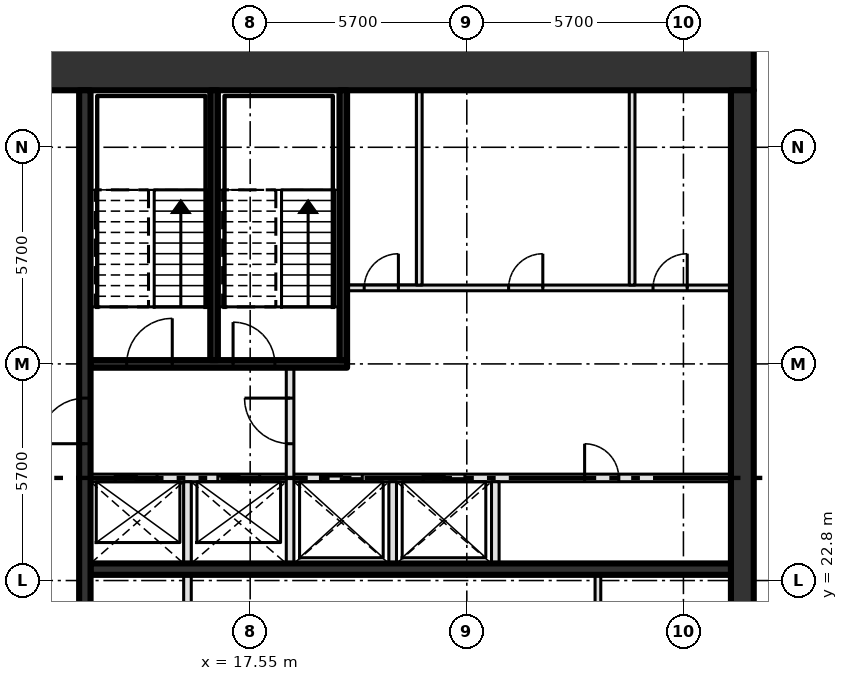
"""IFC4 building model, lengths in metres.
Left out: names, types, materials, properties, quantities, classifications, styles, units other than length and angle.
Written with IfcOpenShell. Run it as: python <this file> out.ifc"""

import sys

from ifc_helpers import new_model, si_unit, direction, frame, frame_2d, origin, place, context, subcontext, project, spatial, rectangle, extrude, element, fill, save


model = new_model("IFC4")
c1 = context("Model", 3, precision=1e-05, world=origin(), true_north=direction((0.0, 1.0)))
c2 = subcontext(c1, "Body", "Model", "MODEL_VIEW")
j1 = project(units=[si_unit("LENGTHUNIT", "METRE"), si_unit("PLANEANGLEUNIT", "RADIAN")], contexts=[c1])
p1 = place(None, origin())
s1 = spatial("IfcSite", under=j1, at=p1, CompositionType="ELEMENT")
p2 = place(p1, origin())
s2 = spatial("IfcBuilding", under=s1, at=p2, CompositionType="ELEMENT")
p3 = place(p2, frame((0.0, 0.0, 306.6)))
s3 = spatial("IfcBuildingStorey", under=s2, at=p3, CompositionType="ELEMENT", Elevation=306.6)
p4 = place(p3, frame((8.0, 36.3, -0.3), z_axis=(0.0, 0.0, 1.0), x_axis=(1.0, 0.0, 0.0)))
e1 = element("IfcWall", 1, at=p4, inside=s3, PredefinedType="SHEAR", context=c2, shape_type="SweptSolid", body=[
    extrude(rectangle(XDim=22.8, YDim=1.2, at=frame_2d((11.4, 0.0))), origin(), (0.0, 0.0, 1.0), 4.2),
])
p5 = place(p4, frame((2.3, 0.0, 0.3)))
e2 = element("IfcOpeningElement", 2, at=p5, cuts=e1, PredefinedType="OPENING", context=c2, shape_type="SweptSolid", body=[
    extrude(rectangle(XDim=1.8, YDim=2.1, at=frame_2d((0.9, 1.05))), frame((0.0, 0.61, 0.0), z_axis=(0.0, -1.0, 0.0), x_axis=(1.0, 0.0, 0.0)), (0.0, 0.0, 1.0), 1.22),
])
p6 = place(p3, frame((30.5, 14.7, -0.3), z_axis=(0.0, 0.0, 1.0), x_axis=(0.0, 1.0, 0.0)))
e3 = element("IfcWall", 3, at=p6, inside=s3, PredefinedType="SHEAR", context=c2, shape_type="SweptSolid", body=[
    extrude(rectangle(XDim=21.0, YDim=0.6, at=frame_2d((10.5, 0.0))), origin(), (0.0, 0.0, 1.0), 4.2),
])
p7 = place(p3, frame((13.35, 23.1, 0.0), z_axis=(0.0, 0.0, 1.0), x_axis=(1.0, 0.0, 0.0)))
e4 = element("IfcWall", 4, at=p7, inside=s3, PredefinedType="SHEAR", context=c2, shape_type="SweptSolid", body=[
    extrude(rectangle(XDim=16.85, YDim=0.3, at=frame_2d((8.425, 0.0))), origin(), (0.0, 0.0, 1.0), 3.9),
])
p8 = place(p3, frame((13.35, 25.5, 0.0), z_axis=(0.0, 0.0, 1.0), x_axis=(1.0, 0.0, 0.0)))
e5 = element("IfcWall", 5, at=p8, inside=s3, PredefinedType="SOLIDWALL", context=c2, shape_type="SweptSolid", body=[
    extrude(rectangle(XDim=16.85, YDim=0.2, at=frame_2d((8.425, 0.0))), origin(), (0.0, 0.0, 1.0), 3.9),
])
p9 = place(p8, frame((0.65, 0.0, 0.0)))
e6 = element("IfcOpeningElement", 6, at=p9, cuts=e5, PredefinedType="OPENING", context=c2, shape_type="SweptSolid", body=[
    extrude(rectangle(XDim=1.1, YDim=2.1, at=frame_2d((0.55, 1.05))), frame((0.0, 0.11, 0.0), z_axis=(0.0, -1.0, 0.0), x_axis=(1.0, 0.0, 0.0)), (0.0, 0.0, 1.0), 0.22),
])
p10 = place(p8, frame((3.35, 0.0, 0.0)))
e7 = element("IfcOpeningElement", 7, at=p10, cuts=e5, PredefinedType="OPENING", context=c2, shape_type="SweptSolid", body=[
    extrude(rectangle(XDim=1.1, YDim=2.1, at=frame_2d((0.55, 1.05))), frame((0.0, 0.11, 0.0), z_axis=(0.0, -1.0, 0.0), x_axis=(1.0, 0.0, 0.0)), (0.0, 0.0, 1.0), 0.22),
])
p11 = place(p8, frame((6.05, 0.0, 0.0)))
e8 = element("IfcOpeningElement", 8, at=p11, cuts=e5, PredefinedType="OPENING", context=c2, shape_type="SweptSolid", body=[
    extrude(rectangle(XDim=1.1, YDim=2.1, at=frame_2d((0.55, 1.05))), frame((0.0, 0.11, 0.0), z_axis=(0.0, -1.0, 0.0), x_axis=(1.0, 0.0, 0.0)), (0.0, 0.0, 1.0), 0.22),
])
p12 = place(p8, frame((8.75, 0.0, 0.0)))
e9 = element("IfcOpeningElement", 9, at=p12, cuts=e5, PredefinedType="OPENING", context=c2, shape_type="SweptSolid", body=[
    extrude(rectangle(XDim=1.1, YDim=2.1, at=frame_2d((0.55, 1.05))), frame((0.0, 0.11, 0.0), z_axis=(0.0, -1.0, 0.0), x_axis=(1.0, 0.0, 0.0)), (0.0, 0.0, 1.0), 0.22),
])
p13 = place(p8, frame((13.0, 0.0, 0.0)))
e10 = element("IfcOpeningElement", 10, at=p13, cuts=e5, PredefinedType="OPENING", context=c2, shape_type="SweptSolid", body=[
    extrude(rectangle(XDim=0.9, YDim=2.1, at=frame_2d((0.45, 1.05))), frame((0.0, 0.11, 0.0), z_axis=(0.0, -1.0, 0.0), x_axis=(1.0, 0.0, 0.0)), (0.0, 0.0, 1.0), 0.22),
])
p14 = place(p3, frame((13.35, 28.5, 0.0), z_axis=(0.0, 0.0, 1.0), x_axis=(1.0, 0.0, 0.0)))
e11 = element("IfcWall", 11, at=p14, inside=s3, PredefinedType="SOLIDWALL", context=c2, shape_type="SweptSolid", body=[
    extrude(rectangle(XDim=6.75, YDim=0.2, at=frame_2d((3.375, 0.0))), origin(), (0.0, 0.0, 1.0), 3.9),
])
p15 = place(p14, frame((0.95, 0.0, 0.0)))
e12 = element("IfcOpeningElement", 12, at=p15, cuts=e11, PredefinedType="OPENING", context=c2, shape_type="SweptSolid", body=[
    extrude(rectangle(XDim=1.2, YDim=2.1, at=frame_2d((0.6, 1.05))), frame((0.0, 0.11, 0.0), z_axis=(0.0, -1.0, 0.0), x_axis=(1.0, 0.0, 0.0)), (0.0, 0.0, 1.0), 0.22),
])
p16 = place(p14, frame((3.75, 0.0, 0.0)))
e13 = element("IfcOpeningElement", 13, at=p16, cuts=e11, PredefinedType="OPENING", context=c2, shape_type="SweptSolid", body=[
    extrude(rectangle(XDim=1.1, YDim=2.1, at=frame_2d((0.55, 1.05))), frame((0.0, 0.11, 0.0), z_axis=(0.0, -1.0, 0.0), x_axis=(1.0, 0.0, 0.0)), (0.0, 0.0, 1.0), 0.22),
])
p17 = place(p3, frame((20.1, 30.5, 0.0), z_axis=(0.0, 0.0, 1.0), x_axis=(1.0, 0.0, 0.0)))
e14 = element("IfcWall", 14, at=p17, inside=s3, PredefinedType="PARTITIONING", context=c2, shape_type="SweptSolid", body=[
    extrude(rectangle(XDim=10.1, YDim=0.15, at=frame_2d((5.05, 0.0))), origin(), (0.0, 0.0, 1.0), 3.9),
])
p18 = place(p17, frame((0.45, 0.0, 0.0)))
e15 = element("IfcOpeningElement", 15, at=p18, cuts=e14, PredefinedType="OPENING", context=c2, shape_type="SweptSolid", body=[
    extrude(rectangle(XDim=0.9, YDim=2.1, at=frame_2d((0.45, 1.05))), frame((0.0, 0.085, 0.0), z_axis=(0.0, -1.0, 0.0), x_axis=(1.0, 0.0, 0.0)), (0.0, 0.0, 1.0), 0.17),
])
p19 = place(p17, frame((4.25, 0.0, 0.0)))
e16 = element("IfcOpeningElement", 16, at=p19, cuts=e14, PredefinedType="OPENING", context=c2, shape_type="SweptSolid", body=[
    extrude(rectangle(XDim=0.9, YDim=2.1, at=frame_2d((0.45, 1.05))), frame((0.0, 0.085, 0.0), z_axis=(0.0, -1.0, 0.0), x_axis=(1.0, 0.0, 0.0)), (0.0, 0.0, 1.0), 0.17),
])
p20 = place(p17, frame((8.05, 0.0, 0.0)))
e17 = element("IfcOpeningElement", 17, at=p20, cuts=e14, PredefinedType="OPENING", context=c2, shape_type="SweptSolid", body=[
    extrude(rectangle(XDim=0.9, YDim=2.1, at=frame_2d((0.45, 1.05))), frame((0.0, 0.085, 0.0), z_axis=(0.0, -1.0, 0.0), x_axis=(1.0, 0.0, 0.0)), (0.0, 0.0, 1.0), 0.17),
])
p21 = place(p3, frame((13.2, 14.7, 0.0), z_axis=(0.0, 0.0, 1.0), x_axis=(0.0, 1.0, 0.0)))
e18 = element("IfcWall", 18, at=p21, inside=s3, PredefinedType="SHEAR", context=c2, shape_type="SweptSolid", body=[
    extrude(rectangle(XDim=21.0, YDim=0.3, at=frame_2d((10.5, 0.0))), origin(), (0.0, 0.0, 1.0), 3.9),
])
p22 = place(p21, frame((3.6, 0.0, 0.0)))
e19 = element("IfcOpeningElement", 19, at=p22, cuts=e18, PredefinedType="OPENING", context=c2, shape_type="SweptSolid", body=[
    extrude(rectangle(XDim=1.8, YDim=2.1, at=frame_2d((0.9, 1.05))), frame((0.0, 0.16, 0.0), z_axis=(0.0, -1.0, 0.0), x_axis=(1.0, 0.0, 0.0)), (0.0, 0.0, 1.0), 0.32),
])
p23 = place(p21, frame((11.7, 0.0, 0.0)))
e20 = element("IfcOpeningElement", 20, at=p23, cuts=e18, PredefinedType="OPENING", context=c2, shape_type="SweptSolid", body=[
    extrude(rectangle(XDim=1.2, YDim=2.1, at=frame_2d((0.6, 1.05))), frame((0.0, 0.16, 0.0), z_axis=(0.0, -1.0, 0.0), x_axis=(1.0, 0.0, 0.0)), (0.0, 0.0, 1.0), 0.32),
])
p24 = place(p3, frame((15.9, 20.775, 0.0), z_axis=(0.0, 0.0, 1.0), x_axis=(0.0, 1.0, 0.0)))
e21 = element("IfcWall", 21, at=p24, inside=s3, PredefinedType="SOLIDWALL", context=c2, shape_type="SweptSolid", body=[
    extrude(rectangle(XDim=4.625, YDim=0.2, at=frame_2d((2.312, 0.0))), origin(), (0.0, 0.0, 1.0), 3.9),
])
p25 = place(p3, frame((16.6, 28.6, 0.0), z_axis=(0.0, 0.0, 1.0), x_axis=(0.0, 1.0, 0.0)))
e22 = element("IfcWall", 22, at=p25, inside=s3, PredefinedType="SOLIDWALL", context=c2, shape_type="SweptSolid", body=[
    extrude(rectangle(XDim=7.1, YDim=0.2, at=frame_2d((3.55, 0.0))), origin(), (0.0, 0.0, 1.0), 3.9),
])
p26 = place(p3, frame((18.6, 23.25, 0.0), z_axis=(0.0, 0.0, 1.0), x_axis=(0.0, 1.0, 0.0)))
e23 = element("IfcWall", 23, at=p26, inside=s3, PredefinedType="SOLIDWALL", context=c2, shape_type="SweptSolid", body=[
    extrude(rectangle(XDim=5.15, YDim=0.2, at=frame_2d((2.575, 0.0))), origin(), (0.0, 0.0, 1.0), 3.9),
])
p27 = place(p26, frame((3.15, 0.0, 0.0)))
e24 = element("IfcOpeningElement", 24, at=p27, cuts=e23, PredefinedType="OPENING", context=c2, shape_type="SweptSolid", body=[
    extrude(rectangle(XDim=1.2, YDim=2.1, at=frame_2d((0.6, 1.05))), frame((0.0, 0.11, 0.0), z_axis=(0.0, -1.0, 0.0), x_axis=(1.0, 0.0, 0.0)), (0.0, 0.0, 1.0), 0.22),
])
p28 = place(p3, frame((20.0, 28.6, 0.0), z_axis=(0.0, 0.0, 1.0), x_axis=(0.0, 1.0, 0.0)))
e25 = element("IfcWall", 25, at=p28, inside=s3, PredefinedType="SOLIDWALL", context=c2, shape_type="SweptSolid", body=[
    extrude(rectangle(XDim=7.1, YDim=0.2, at=frame_2d((3.55, 0.0))), origin(), (0.0, 0.0, 1.0), 3.9),
])
p29 = place(p3, frame((21.3, 23.25, 0.0), z_axis=(0.0, 0.0, 1.0), x_axis=(0.0, 1.0, 0.0)))
e26 = element("IfcWall", 26, at=p29, inside=s3, PredefinedType="SOLIDWALL", context=c2, shape_type="SweptSolid", body=[
    extrude(rectangle(XDim=2.15, YDim=0.2, at=frame_2d((1.075, 0.0))), origin(), (0.0, 0.0, 1.0), 3.9),
])
p30 = place(p3, frame((22.0, 30.575, 0.0), z_axis=(0.0, 0.0, 1.0), x_axis=(0.0, 1.0, 0.0)))
e27 = element("IfcWall", 27, at=p30, inside=s3, PredefinedType="PARTITIONING", context=c2, shape_type="SweptSolid", body=[
    extrude(rectangle(XDim=5.125, YDim=0.15, at=frame_2d((2.562, 0.0))), origin(), (0.0, 0.0, 1.0), 3.9),
])
p31 = place(p3, frame((24.0, 23.25, 0.0), z_axis=(0.0, 0.0, 1.0), x_axis=(0.0, 1.0, 0.0)))
e28 = element("IfcWall", 28, at=p31, inside=s3, PredefinedType="SOLIDWALL", context=c2, shape_type="SweptSolid", body=[
    extrude(rectangle(XDim=2.15, YDim=0.2, at=frame_2d((1.075, 0.0))), origin(), (0.0, 0.0, 1.0), 3.9),
])
p32 = place(p3, frame((26.7, 20.775, 0.0), z_axis=(0.0, 0.0, 1.0), x_axis=(0.0, 1.0, 0.0)))
e29 = element("IfcWall", 29, at=p32, inside=s3, PredefinedType="PARTITIONING", context=c2, shape_type="SweptSolid", body=[
    extrude(rectangle(XDim=2.175, YDim=0.15, at=frame_2d((1.087, 0.0))), origin(), (0.0, 0.0, 1.0), 3.9),
])
p33 = place(p3, frame((27.6, 30.575, 0.0), z_axis=(0.0, 0.0, 1.0), x_axis=(0.0, 1.0, 0.0)))
e30 = element("IfcWall", 30, at=p33, inside=s3, PredefinedType="PARTITIONING", context=c2, shape_type="SweptSolid", body=[
    extrude(rectangle(XDim=5.125, YDim=0.15, at=frame_2d((2.562, 0.0))), origin(), (0.0, 0.0, 1.0), 3.9),
])
p34 = place(p9, origin())
e31 = element("IfcDoor", 31, at=p34, inside=s3, OperationType="SLIDING_TO_LEFT", PredefinedType="DOOR", context=c2, shape_type="SweptSolid", body=[
    extrude(rectangle(XDim=1.1, YDim=2.1, at=frame_2d((0.55, 1.05))), frame((0.0, 0.025, 0.0), z_axis=(0.0, -1.0, 0.0), x_axis=(1.0, 0.0, 0.0)), (0.0, 0.0, 1.0), 0.05),
])
fill(e6, e31)
p35 = place(p10, origin())
e32 = element("IfcDoor", 32, at=p35, inside=s3, OperationType="SLIDING_TO_LEFT", PredefinedType="DOOR", context=c2, shape_type="SweptSolid", body=[
    extrude(rectangle(XDim=1.1, YDim=2.1, at=frame_2d((0.55, 1.05))), frame((0.0, 0.025, 0.0), z_axis=(0.0, -1.0, 0.0), x_axis=(1.0, 0.0, 0.0)), (0.0, 0.0, 1.0), 0.05),
])
fill(e7, e32)
p36 = place(p11, origin())
e33 = element("IfcDoor", 33, at=p36, inside=s3, OperationType="SLIDING_TO_LEFT", PredefinedType="DOOR", context=c2, shape_type="SweptSolid", body=[
    extrude(rectangle(XDim=1.1, YDim=2.1, at=frame_2d((0.55, 1.05))), frame((0.0, 0.025, 0.0), z_axis=(0.0, -1.0, 0.0), x_axis=(1.0, 0.0, 0.0)), (0.0, 0.0, 1.0), 0.05),
])
fill(e8, e33)
p37 = place(p12, origin())
e34 = element("IfcDoor", 34, at=p37, inside=s3, OperationType="SLIDING_TO_LEFT", PredefinedType="DOOR", context=c2, shape_type="SweptSolid", body=[
    extrude(rectangle(XDim=1.1, YDim=2.1, at=frame_2d((0.55, 1.05))), frame((0.0, 0.025, 0.0), z_axis=(0.0, -1.0, 0.0), x_axis=(1.0, 0.0, 0.0)), (0.0, 0.0, 1.0), 0.05),
])
fill(e9, e34)
p38 = place(p13, origin())
e35 = element("IfcDoor", 35, at=p38, inside=s3, OperationType="SINGLE_SWING_LEFT", PredefinedType="DOOR", context=c2, shape_type="SweptSolid", body=[
    extrude(rectangle(XDim=0.9, YDim=2.1, at=frame_2d((0.45, 1.05))), frame((0.0, 0.025, 0.0), z_axis=(0.0, -1.0, 0.0), x_axis=(1.0, 0.0, 0.0)), (0.0, 0.0, 1.0), 0.05),
])
fill(e10, e35)
p39 = place(p18, origin())
e36 = element("IfcDoor", 36, at=p39, inside=s3, OperationType="SINGLE_SWING_RIGHT", PredefinedType="DOOR", context=c2, shape_type="SweptSolid", body=[
    extrude(rectangle(XDim=0.9, YDim=2.1, at=frame_2d((0.45, 1.05))), frame((0.0, 0.025, 0.0), z_axis=(0.0, -1.0, 0.0), x_axis=(1.0, 0.0, 0.0)), (0.0, 0.0, 1.0), 0.05),
])
fill(e15, e36)
p40 = place(p19, origin())
e37 = element("IfcDoor", 37, at=p40, inside=s3, OperationType="SINGLE_SWING_RIGHT", PredefinedType="DOOR", context=c2, shape_type="SweptSolid", body=[
    extrude(rectangle(XDim=0.9, YDim=2.1, at=frame_2d((0.45, 1.05))), frame((0.0, 0.025, 0.0), z_axis=(0.0, -1.0, 0.0), x_axis=(1.0, 0.0, 0.0)), (0.0, 0.0, 1.0), 0.05),
])
fill(e16, e37)
p41 = place(p20, origin())
e38 = element("IfcDoor", 38, at=p41, inside=s3, OperationType="SINGLE_SWING_RIGHT", PredefinedType="DOOR", context=c2, shape_type="SweptSolid", body=[
    extrude(rectangle(XDim=0.9, YDim=2.1, at=frame_2d((0.45, 1.05))), frame((0.0, 0.025, 0.0), z_axis=(0.0, -1.0, 0.0), x_axis=(1.0, 0.0, 0.0)), (0.0, 0.0, 1.0), 0.05),
])
fill(e17, e38)
p42 = place(p15, origin())
e39 = element("IfcDoor", 39, at=p42, inside=s3, OperationType="SINGLE_SWING_RIGHT", PredefinedType="DOOR", context=c2, shape_type="SweptSolid", body=[
    extrude(rectangle(XDim=1.2, YDim=2.1, at=frame_2d((0.6, 1.05))), frame((0.0, 0.025, 0.0), z_axis=(0.0, -1.0, 0.0), x_axis=(1.0, 0.0, 0.0)), (0.0, 0.0, 1.0), 0.05),
])
fill(e12, e39)
p43 = place(p16, origin())
e40 = element("IfcDoor", 40, at=p43, inside=s3, OperationType="SINGLE_SWING_LEFT", PredefinedType="DOOR", context=c2, shape_type="SweptSolid", body=[
    extrude(rectangle(XDim=1.1, YDim=2.1, at=frame_2d((0.55, 1.05))), frame((0.0, 0.025, 0.0), z_axis=(0.0, -1.0, 0.0), x_axis=(1.0, 0.0, 0.0)), (0.0, 0.0, 1.0), 0.05),
])
fill(e13, e40)
p44 = place(p23, origin())
e41 = element("IfcDoor", 41, at=p44, inside=s3, OperationType="SINGLE_SWING_LEFT", PredefinedType="DOOR", context=c2, shape_type="SweptSolid", body=[
    extrude(rectangle(XDim=1.2, YDim=2.1, at=frame_2d((0.6, 1.05))), frame((0.0, 0.025, 0.0), z_axis=(0.0, -1.0, 0.0), x_axis=(1.0, 0.0, 0.0)), (0.0, 0.0, 1.0), 0.05),
])
fill(e20, e41)
p45 = place(p27, origin())
e42 = element("IfcDoor", 42, at=p45, inside=s3, OperationType="SINGLE_SWING_RIGHT", PredefinedType="DOOR", context=c2, shape_type="SweptSolid", body=[
    extrude(rectangle(XDim=1.2, YDim=2.1, at=frame_2d((0.6, 1.05))), frame((0.0, 0.025, 0.0), z_axis=(0.0, -1.0, 0.0), x_axis=(1.0, 0.0, 0.0)), (0.0, 0.0, 1.0), 0.05),
])
fill(e24, e42)
save(model, sys.argv[1])
